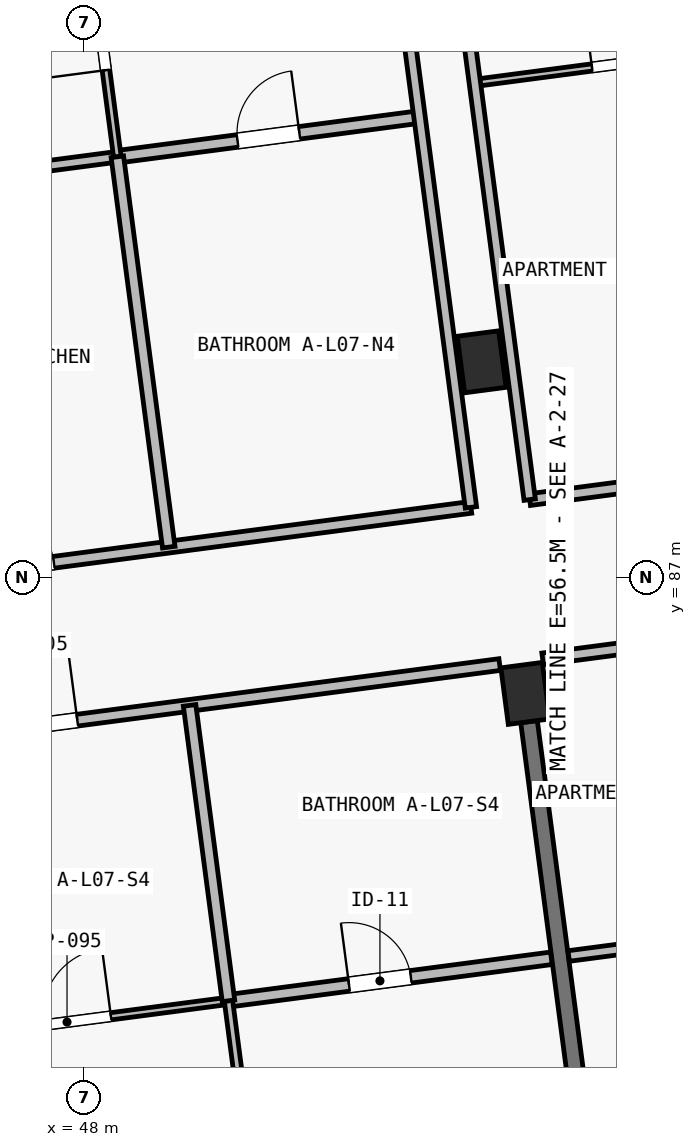
"""IFC4 building model, lengths in metres.
Left out: names, types, materials, properties, quantities, classifications, styles, units other than length and angle.
Written with IfcOpenShell. Run it as: python <this file> out.ifc"""

import sys

from ifc_helpers import new_model, si_unit, direction, frame, frame_2d, origin, origin_2d, place, context, subcontext, project, spatial, rectangle, extrude, element, fill, save


model = new_model("IFC4")
c1 = context("Model", 3, precision=1e-05, world=origin(), true_north=direction((0.0, 1.0)))
c2 = subcontext(c1, "Body", "Model", "MODEL_VIEW")
j1 = project(units=[si_unit("LENGTHUNIT", "METRE"), si_unit("PLANEANGLEUNIT", "RADIAN")], contexts=[c1])
p1 = place(None, origin())
s1 = spatial("IfcSite", under=j1, at=p1, CompositionType="ELEMENT")
p2 = place(p1, origin())
s2 = spatial("IfcBuilding", under=s1, at=p2, CompositionType="ELEMENT")
p3 = place(p2, frame((0.0, 0.0, 24.65)))
s3 = spatial("IfcBuildingStorey", under=s2, at=p3, CompositionType="ELEMENT", Elevation=24.65)
for number, where, z_axis, x_axis in (
    (1, (53.805, 85.476, 0.0), (0.0, 0.0, 1.0), (0.991, 0.131, 0.0)),
    (2, (53.231, 89.839, 0.0), (0.0, 0.0, 1.0), (0.991, 0.131, 0.0)),
):
    element("IfcColumn", number, at=place(p3, frame(where, z_axis=z_axis, x_axis=x_axis)), inside=s3, PredefinedType="COLUMN", context=c2, shape_type="SweptSolid", body=[
        extrude(rectangle(XDim=0.55, YDim=0.75, at=origin_2d()), origin(), (0.0, 0.0, 1.0), 3.25),
    ])
p4 = place(p3, frame((54.775, 78.115, 0.0), z_axis=(0.0, 0.0, 1.0), x_axis=(-0.130519009654, 0.99144580695, 0.0)))
e3 = element("IfcWall", 3, at=p4, inside=s3, PredefinedType="SHEAR", context=c2, shape_type="SweptSolid", body=[
    extrude(rectangle(XDim=7.05, YDim=0.22, at=frame_2d((3.525, 0.0))), origin(), (0.0, 0.0, 1.0), 2.5),
])
p5 = place(p3, frame((45.309, 84.781, 0.0), z_axis=(0.0, 0.0, 1.0), x_axis=(0.991444700604, 0.130527413383, 0.0)))
e4 = element("IfcWall", 4, at=p5, inside=s3, PredefinedType="PARTITIONING", context=c2, shape_type="SweptSolid", body=[
    extrude(rectangle(XDim=8.23, YDim=0.155, at=frame_2d((4.115, 0.0))), origin(), (0.0, 0.0, 1.0), 2.97),
])
p6 = place(p5, frame((1.605, 0.0, 0.0)))
e5 = element("IfcOpeningElement", 5, at=p6, cuts=e4, PredefinedType="OPENING", context=c2, shape_type="SweptSolid", body=[
    extrude(rectangle(XDim=1.02, YDim=2.2, at=frame_2d((0.51, 1.1))), frame((0.0, 0.093, 0.0), z_axis=(0.0, -1.0, 0.0), x_axis=(1.0, 0.0, 0.0)), (0.0, 0.0, 1.0), 0.185),
])
p7 = place(p3, frame((45.652, 80.873, 0.0), z_axis=(0.0, 0.0, 1.0), x_axis=(0.991444014242, 0.130532626667, 0.0)))
e6 = element("IfcWall", 6, at=p7, inside=s3, PredefinedType="PARTITIONING", context=c2, shape_type="SweptSolid", body=[
    extrude(rectangle(XDim=4.285, YDim=0.095, at=frame_2d((2.143, 0.0))), origin(), (0.0, 0.0, 1.0), 2.97),
])
p8 = place(p7, frame((1.825, 0.0, 0.0)))
e7 = element("IfcOpeningElement", 7, at=p8, cuts=e6, PredefinedType="OPENING", context=c2, shape_type="SweptSolid", body=[
    extrude(rectangle(XDim=0.9, YDim=2.1, at=frame_2d((0.45, 1.05))), frame((0.0, 0.062, 0.0), z_axis=(0.0, -1.0, 0.0), x_axis=(1.0, 0.0, 0.0)), (0.0, 0.0, 1.0), 0.125),
])
p9 = place(p3, frame((49.9, 81.432, 0.0), z_axis=(0.0, 0.0, 1.0), x_axis=(0.991444014242, 0.130532626667, 0.0)))
e8 = element("IfcWall", 8, at=p9, inside=s3, PredefinedType="PLUMBINGWALL", context=c2, shape_type="SweptSolid", body=[
    extrude(rectangle(XDim=4.285, YDim=0.165, at=frame_2d((2.143, 0.0))), origin(), (0.0, 0.0, 1.0), 2.97),
])
p10 = place(p9, frame((1.6, 0.0, 0.0)))
e9 = element("IfcOpeningElement", 9, at=p10, cuts=e8, PredefinedType="OPENING", context=c2, shape_type="SweptSolid", body=[
    extrude(rectangle(XDim=0.82, YDim=2.08, at=frame_2d((0.41, 1.04))), frame((0.0, 0.097, 0.0), z_axis=(0.0, -1.0, 0.0), x_axis=(1.0, 0.0, 0.0)), (0.0, 0.0, 1.0), 0.195),
])
p11 = place(p3, frame((50.512, 76.782, 0.0), z_axis=(0.0, 0.0, 1.0), x_axis=(-0.130554157184, 0.991441179315, 0.0)))
e10 = element("IfcWall", 10, at=p11, inside=s3, PredefinedType="PARTITIONING", context=c2, shape_type="SweptSolid", body=[
    extrude(rectangle(XDim=4.69, YDim=0.11, at=frame_2d((2.345, 0.0))), origin(), (0.0, 0.0, 1.0), 2.97),
])
p12 = place(p11, frame((1.35, 0.0, 0.0)))
e11 = element("IfcOpeningElement", 11, at=p12, cuts=e10, PredefinedType="OPENING", context=c2, shape_type="SweptSolid", body=[
    extrude(rectangle(XDim=0.9, YDim=2.1, at=frame_2d((0.45, 1.05))), frame((0.0, 0.07, 0.0), z_axis=(0.0, -1.0, 0.0), x_axis=(1.0, 0.0, 0.0)), (0.0, 0.0, 1.0), 0.14),
])
p13 = place(p3, frame((49.9, 81.432, 0.0), z_axis=(0.0, 0.0, 1.0), x_axis=(-0.130539898676, 0.991443056788, 0.0)))
e12 = element("IfcWall", 12, at=p13, inside=s3, PredefinedType="PLUMBINGWALL", context=c2, shape_type="SweptSolid", body=[
    extrude(rectangle(XDim=3.92, YDim=0.165, at=frame_2d((1.96, 0.0))), origin(), (0.0, 0.0, 1.0), 2.97),
])
p14 = place(p3, frame((54.033, 85.93, 0.0), z_axis=(0.0, 0.0, 1.0), x_axis=(0.991443380249, 0.130537441989, 0.0)))
e13 = element("IfcWall", 13, at=p14, inside=s3, PredefinedType="PARTITIONING", context=c2, shape_type="SweptSolid", body=[
    extrude(rectangle(XDim=8.91, YDim=0.155, at=frame_2d((4.455, 0.0))), origin(), (0.0, 0.0, 1.0), 2.97),
])
p15 = place(p14, frame((1.605, 0.0, 0.0)))
e14 = element("IfcOpeningElement", 14, at=p15, cuts=e13, PredefinedType="OPENING", context=c2, shape_type="SweptSolid", body=[
    extrude(rectangle(XDim=0.98, YDim=2.15, at=frame_2d((0.49, 1.075))), frame((0.0, 0.093, 0.0), z_axis=(0.0, -1.0, 0.0), x_axis=(1.0, 0.0, 0.0)), (0.0, 0.0, 1.0), 0.185),
])
p16 = place(p3, frame((54.376, 82.021, 0.0), z_axis=(0.0, 0.0, 1.0), x_axis=(0.991452356241, 0.130469250419, 0.0)))
e15 = element("IfcWall", 15, at=p16, inside=s3, PredefinedType="PARTITIONING", context=c2, shape_type="SweptSolid", body=[
    extrude(rectangle(XDim=4.285, YDim=0.14, at=frame_2d((2.143, 0.0))), origin(), (0.0, 0.0, 1.0), 2.97),
])
p17 = place(p16, frame((1.825, 0.0, 0.0)))
e16 = element("IfcOpeningElement", 16, at=p17, cuts=e15, PredefinedType="OPENING", context=c2, shape_type="SweptSolid", body=[
    extrude(rectangle(XDim=0.9, YDim=2.1, at=frame_2d((0.45, 1.05))), frame((0.0, 0.085, 0.0), z_axis=(0.0, -1.0, 0.0), x_axis=(1.0, 0.0, 0.0)), (0.0, 0.0, 1.0), 0.17),
])
p18 = place(p3, frame((45.138, 86.877, 0.0), z_axis=(0.0, 0.0, 1.0), x_axis=(0.991444034844, 0.130532470184, 0.0)))
e17 = element("IfcWall", 17, at=p18, inside=s3, PredefinedType="PARTITIONING", context=c2, shape_type="SweptSolid", body=[
    extrude(rectangle(XDim=8.02, YDim=0.155, at=frame_2d((4.01, 0.0))), origin(), (0.0, 0.0, 1.0), 2.97),
])
p19 = place(p18, frame((1.505, 0.0, 0.0)))
e18 = element("IfcOpeningElement", 18, at=p19, cuts=e17, PredefinedType="OPENING", context=c2, shape_type="SweptSolid", body=[
    extrude(rectangle(XDim=0.98, YDim=2.15, at=frame_2d((0.49, 1.075))), frame((0.0, 0.093, 0.0), z_axis=(0.0, -1.0, 0.0), x_axis=(1.0, 0.0, 0.0)), (0.0, 0.0, 1.0), 0.185),
])
p20 = place(p3, frame((44.462, 92.013, 0.0), z_axis=(0.0, 0.0, 1.0), x_axis=(0.991451394038, 0.130476562111, 0.0)))
e19 = element("IfcWall", 19, at=p20, inside=s3, PredefinedType="PARTITIONING", context=c2, shape_type="SweptSolid", body=[
    extrude(rectangle(XDim=4.01, YDim=0.14, at=frame_2d((2.005, 0.0))), origin(), (0.0, 0.0, 1.0), 2.97),
])
p21 = place(p20, frame((1.555, 0.0, 0.0)))
e20 = element("IfcOpeningElement", 20, at=p21, cuts=e19, PredefinedType="OPENING", context=c2, shape_type="SweptSolid", body=[
    extrude(rectangle(XDim=0.9, YDim=2.1, at=frame_2d((0.45, 1.05))), frame((0.0, 0.085, 0.0), z_axis=(0.0, -1.0, 0.0), x_axis=(1.0, 0.0, 0.0)), (0.0, 0.0, 1.0), 0.17),
])
p22 = place(p3, frame((48.438, 92.536, 0.0), z_axis=(0.0, 0.0, 1.0), x_axis=(0.991444553502, 0.130528530716, 0.0)))
e21 = element("IfcWall", 21, at=p22, inside=s3, PredefinedType="PLUMBINGWALL", context=c2, shape_type="SweptSolid", body=[
    extrude(rectangle(XDim=4.01, YDim=0.165, at=frame_2d((2.005, 0.0))), origin(), (0.0, 0.0, 1.0), 2.97),
])
p23 = place(p22, frame((1.595, 0.0, 0.0)))
e22 = element("IfcOpeningElement", 22, at=p23, cuts=e21, PredefinedType="OPENING", context=c2, shape_type="SweptSolid", body=[
    extrude(rectangle(XDim=0.82, YDim=2.08, at=frame_2d((0.41, 1.04))), frame((0.0, 0.097, 0.0), z_axis=(0.0, -1.0, 0.0), x_axis=(1.0, 0.0, 0.0)), (0.0, 0.0, 1.0), 0.195),
])
p24 = place(p3, frame((48.438, 92.536, 0.0), z_axis=(0.0, 0.0, 1.0), x_axis=(-0.130508755558, 0.991447156798, 0.0)))
e23 = element("IfcWall", 23, at=p24, inside=s3, PredefinedType="PARTITIONING", context=c2, shape_type="SweptSolid", body=[
    extrude(rectangle(XDim=4.89, YDim=0.1, at=frame_2d((2.445, 0.0))), origin(), (0.0, 0.0, 1.0), 2.97),
])
p25 = place(p24, frame((1.15, 0.0, 0.0)))
e24 = element("IfcOpeningElement", 24, at=p25, cuts=e23, PredefinedType="OPENING", context=c2, shape_type="SweptSolid", body=[
    extrude(rectangle(XDim=0.88, YDim=2.1, at=frame_2d((0.44, 1.05))), frame((0.0, 0.065, 0.0), z_axis=(0.0, -1.0, 0.0), x_axis=(1.0, 0.0, 0.0)), (0.0, 0.0, 1.0), 0.13),
])
p26 = place(p3, frame((49.114, 87.401, 0.0), z_axis=(0.0, 0.0, 1.0), x_axis=(-0.130558146496, 0.99144065399, 0.0)))
e25 = element("IfcWall", 25, at=p26, inside=s3, PredefinedType="PLUMBINGWALL", context=c2, shape_type="SweptSolid", body=[
    extrude(rectangle(XDim=5.18, YDim=0.165, at=frame_2d((2.59, 0.0))), origin(), (0.0, 0.0, 1.0), 2.97),
])
p27 = place(p3, frame((53.09, 87.924, 0.0), z_axis=(0.0, 0.0, 1.0), x_axis=(-0.130534161944, 0.991443812107, 0.0)))
e26 = element("IfcWall", 26, at=p27, inside=s3, PredefinedType="PARTITIONING", context=c2, shape_type="SweptSolid", body=[
    extrude(rectangle(XDim=10.07, YDim=0.15, at=frame_2d((5.035, 0.0))), origin(), (0.0, 0.0, 1.0), 2.97),
])
p28 = place(p3, frame((53.863, 88.026, 0.0), z_axis=(0.0, 0.0, 1.0), x_axis=(0.991447973994, 0.130502547346, 0.0)))
e27 = element("IfcWall", 27, at=p28, inside=s3, PredefinedType="PARTITIONING", context=c2, shape_type="SweptSolid", body=[
    extrude(rectangle(XDim=8.02, YDim=0.155, at=frame_2d((4.01, 0.0))), origin(), (0.0, 0.0, 1.0), 2.97),
])
p29 = place(p28, frame((1.505, 0.0, 0.0)))
e28 = element("IfcOpeningElement", 28, at=p29, cuts=e27, PredefinedType="OPENING", context=c2, shape_type="SweptSolid", body=[
    extrude(rectangle(XDim=1.02, YDim=2.2, at=frame_2d((0.51, 1.1))), frame((0.0, 0.093, 0.0), z_axis=(0.0, -1.0, 0.0), x_axis=(1.0, 0.0, 0.0)), (0.0, 0.0, 1.0), 0.185),
])
p30 = place(p3, frame((53.141, 93.509, 0.0), z_axis=(0.0, 0.0, 1.0), x_axis=(0.991444553502, 0.130528530716, 0.0)))
e29 = element("IfcWall", 29, at=p30, inside=s3, PredefinedType="PARTITIONING", context=c2, shape_type="SweptSolid", body=[
    extrude(rectangle(XDim=4.01, YDim=0.095, at=frame_2d((2.005, 0.0))), origin(), (0.0, 0.0, 1.0), 2.97),
])
p31 = place(p30, frame((1.555, 0.0, 0.0)))
e30 = element("IfcOpeningElement", 30, at=p31, cuts=e29, PredefinedType="OPENING", context=c2, shape_type="SweptSolid", body=[
    extrude(rectangle(XDim=0.9, YDim=2.1, at=frame_2d((0.45, 1.05))), frame((0.0, 0.062, 0.0), z_axis=(0.0, -1.0, 0.0), x_axis=(1.0, 0.0, 0.0)), (0.0, 0.0, 1.0), 0.125),
])
p32 = place(p3, frame((53.863, 88.026, 0.0), z_axis=(0.0, 0.0, 1.0), x_axis=(-0.130534161944, 0.991443812107, 0.0)))
e31 = element("IfcWall", 31, at=p32, inside=s3, PredefinedType="PARTITIONING", context=c2, shape_type="SweptSolid", body=[
    extrude(rectangle(XDim=10.07, YDim=0.15, at=frame_2d((5.035, 0.0))), origin(), (0.0, 0.0, 1.0), 2.97),
])
p33 = place(p6, origin())
e32 = element("IfcDoor", 32, at=p33, inside=s3, OperationType="SINGLE_SWING_RIGHT", PredefinedType="DOOR", context=c2, shape_type="SweptSolid", body=[
    extrude(rectangle(XDim=1.02, YDim=2.2, at=frame_2d((0.51, 1.1))), frame((0.0, 0.025, 0.0), z_axis=(0.0, -1.0, 0.0), x_axis=(1.0, 0.0, 0.0)), (0.0, 0.0, 1.0), 0.05),
])
fill(e5, e32)
p34 = place(p8, origin())
e33 = element("IfcDoor", 33, at=p34, inside=s3, OperationType="SINGLE_SWING_RIGHT", PredefinedType="DOOR", context=c2, shape_type="SweptSolid", body=[
    extrude(rectangle(XDim=0.9, YDim=2.1, at=frame_2d((0.45, 1.05))), frame((0.0, 0.025, 0.0), z_axis=(0.0, -1.0, 0.0), x_axis=(1.0, 0.0, 0.0)), (0.0, 0.0, 1.0), 0.05),
])
fill(e7, e33)
p35 = place(p10, origin())
e34 = element("IfcDoor", 34, at=p35, inside=s3, OperationType="SINGLE_SWING_LEFT", PredefinedType="DOOR", context=c2, shape_type="SweptSolid", body=[
    extrude(rectangle(XDim=0.82, YDim=2.08, at=frame_2d((0.41, 1.04))), frame((0.0, 0.025, 0.0), z_axis=(0.0, -1.0, 0.0), x_axis=(1.0, 0.0, 0.0)), (0.0, 0.0, 1.0), 0.05),
])
fill(e9, e34)
p36 = place(p19, origin())
e35 = element("IfcDoor", 35, at=p36, inside=s3, OperationType="SINGLE_SWING_LEFT", PredefinedType="DOOR", context=c2, shape_type="SweptSolid", body=[
    extrude(rectangle(XDim=0.98, YDim=2.15, at=frame_2d((0.49, 1.075))), frame((0.0, 0.025, 0.0), z_axis=(0.0, -1.0, 0.0), x_axis=(1.0, 0.0, 0.0)), (0.0, 0.0, 1.0), 0.05),
])
fill(e18, e35)
p37 = place(p23, origin())
e36 = element("IfcDoor", 36, at=p37, inside=s3, OperationType="SINGLE_SWING_RIGHT", PredefinedType="DOOR", context=c2, shape_type="SweptSolid", body=[
    extrude(rectangle(XDim=0.82, YDim=2.08, at=frame_2d((0.41, 1.04))), frame((0.0, 0.025, 0.0), z_axis=(0.0, -1.0, 0.0), x_axis=(1.0, 0.0, 0.0)), (0.0, 0.0, 1.0), 0.05),
])
fill(e22, e36)
p38 = place(p25, origin())
e37 = element("IfcDoor", 37, at=p38, inside=s3, OperationType="SINGLE_SWING_LEFT", PredefinedType="DOOR", context=c2, shape_type="SweptSolid", body=[
    extrude(rectangle(XDim=0.88, YDim=2.1, at=frame_2d((0.44, 1.05))), frame((0.0, 0.025, 0.0), z_axis=(0.0, -1.0, 0.0), x_axis=(1.0, 0.0, 0.0)), (0.0, 0.0, 1.0), 0.05),
])
fill(e24, e37)
p39 = place(p31, origin())
e38 = element("IfcDoor", 38, at=p39, inside=s3, OperationType="SINGLE_SWING_LEFT", PredefinedType="DOOR", context=c2, shape_type="SweptSolid", body=[
    extrude(rectangle(XDim=0.9, YDim=2.1, at=frame_2d((0.45, 1.05))), frame((0.0, 0.025, 0.0), z_axis=(0.0, -1.0, 0.0), x_axis=(1.0, 0.0, 0.0)), (0.0, 0.0, 1.0), 0.05),
])
fill(e30, e38)
save(model, sys.argv[1])
